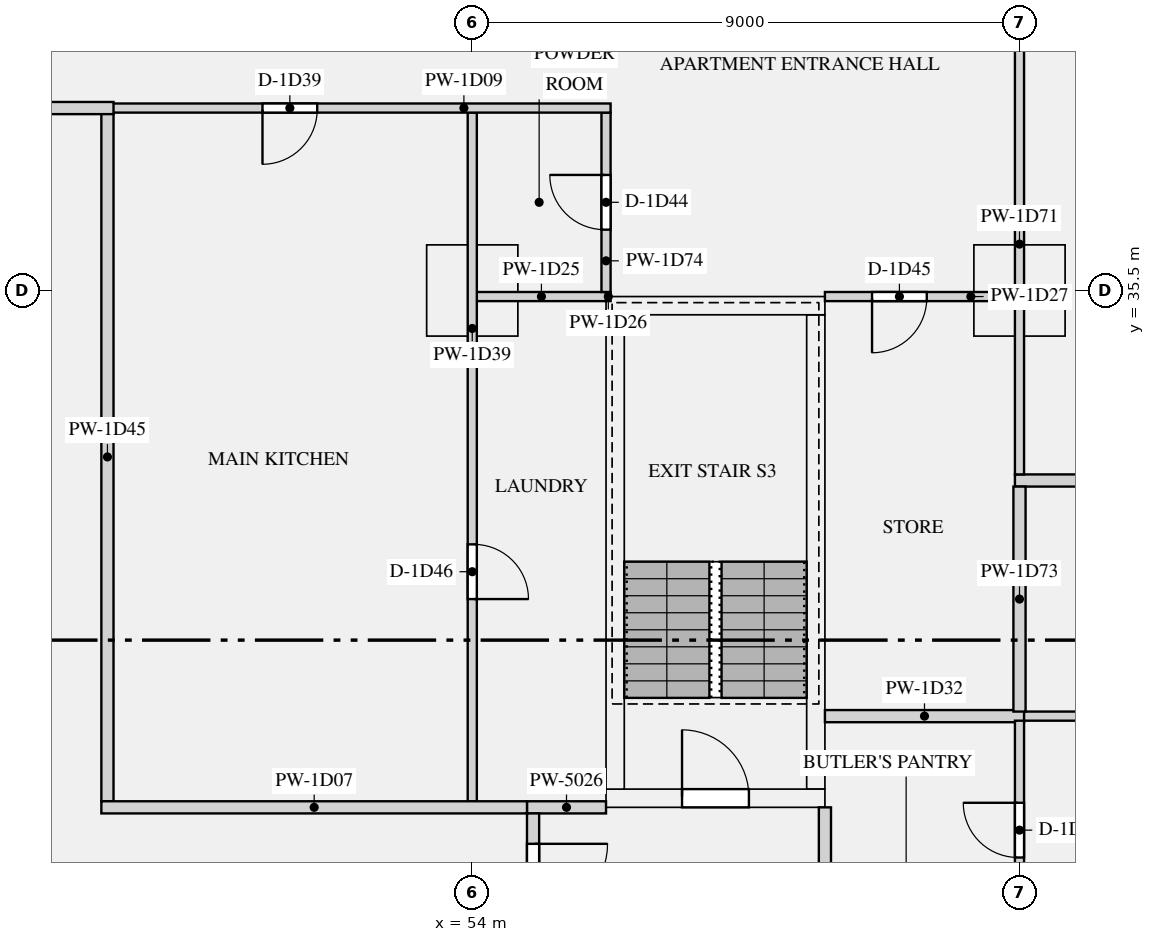
"""IFC4 building model, lengths in metres.
Left out: names, types, materials, properties, quantities, classifications, styles, units other than length and angle.
Written with IfcOpenShell. Run it as: python <this file> out.ifc"""

import sys

from ifc_helpers import new_model, si_unit, direction, frame, frame_2d, origin, origin_2d, place, context, subcontext, project, spatial, rectangle, extrude, element, fill, save


model = new_model("IFC4")
c1 = context("Model", 3, precision=1e-05, world=origin(), true_north=direction((0.0, 1.0)))
c2 = subcontext(c1, "Body", "Model", "MODEL_VIEW")
j1 = project(units=[si_unit("LENGTHUNIT", "METRE"), si_unit("PLANEANGLEUNIT", "RADIAN")], contexts=[c1])
p1 = place(None, origin())
s1 = spatial("IfcSite", under=j1, at=p1, CompositionType="ELEMENT")
p2 = place(p1, origin())
s2 = spatial("IfcBuilding", under=s1, at=p2, CompositionType="ELEMENT")
p3 = place(p2, frame((0.0, 0.0, 47.85)))
s3 = spatial("IfcBuildingStorey", under=s2, at=p3, CompositionType="ELEMENT", Elevation=47.85)
for number, where, z_axis, x_axis in (
    (1, (54.0, 35.5, 0.0), (0.0, 0.0, 1.0), (1.0, 0.0, 0.0)),
    (2, (63.0, 35.5, 0.0), (0.0, 0.0, 1.0), (1.0, 0.0, 0.0)),
):
    element("IfcColumn", number, at=place(p3, frame(where, z_axis=z_axis, x_axis=x_axis)), inside=s3, PredefinedType="COLUMN", context=c2, shape_type="SweptSolid", body=[
        extrude(rectangle(XDim=1.5, YDim=1.5, at=origin_2d()), origin(), (0.0, 0.0, 1.0), 3.15),
    ])
p4 = place(p3, frame((56.2, 27.15, 0.0), z_axis=(0.0, 0.0, 1.0), x_axis=(1.0, 0.0, 0.0)))
e3 = element("IfcWall", 3, at=p4, inside=s3, PredefinedType="SHEAR", context=c2, shape_type="SweptSolid", body=[
    extrude(rectangle(XDim=3.6, YDim=0.3, at=frame_2d((1.8, 0.0))), origin(), (0.0, 0.0, 1.0), 3.15),
])
p5 = place(p4, frame((1.25, 0.0, 0.0)))
e4 = element("IfcOpeningElement", 4, at=p5, cuts=e3, PredefinedType="OPENING", context=c2, shape_type="SweptSolid", body=[
    extrude(rectangle(XDim=1.1, YDim=2.1, at=frame_2d((0.55, 1.05))), frame((0.0, 0.16, 0.0), z_axis=(0.0, -1.0, 0.0), x_axis=(1.0, 0.0, 0.0)), (0.0, 0.0, 1.0), 0.32),
])
p6 = place(p3, frame((56.2, 35.25, 0.0), z_axis=(0.0, 0.0, 1.0), x_axis=(1.0, 0.0, 0.0)))
e5 = element("IfcWall", 5, at=p6, inside=s3, PredefinedType="SHEAR", context=c2, shape_type="SweptSolid", body=[
    extrude(rectangle(XDim=3.6, YDim=0.3, at=frame_2d((1.8, 0.0))), origin(), (0.0, 0.0, 1.0), 3.15),
])
for number, where, z_axis, x_axis in (
    (6, (56.35, 27.3, 0.0), (0.0, 0.0, 1.0), (0.0, 1.0, 0.0)),
    (7, (59.65, 27.3, 0.0), (0.0, 0.0, 1.0), (0.0, 1.0, 0.0)),
):
    element("IfcWall", number, at=place(p3, frame(where, z_axis=z_axis, x_axis=x_axis)), inside=s3, PredefinedType="SHEAR", context=c2, shape_type="SweptSolid", body=[
        extrude(rectangle(XDim=7.8, YDim=0.3, at=frame_2d((3.9, 0.0))), origin(), (0.0, 0.0, 1.0), 3.15),
    ])
p7 = place(p3, frame((54.9, 27.0, 0.0), z_axis=(0.0, 0.0, 1.0), x_axis=(1.0, 0.0, 0.0)))
e8 = element("IfcWall", 8, at=p7, inside=s3, PredefinedType="PARTITIONING", context=c2, shape_type="SweptSolid", body=[
    extrude(rectangle(XDim=1.3, YDim=0.2, at=frame_2d((0.65, 0.0))), origin(), (0.0, 0.0, 1.0), 2.83),
])
p8 = place(p3, frame((55.0, 23.1, 0.0), z_axis=(0.0, 0.0, 1.0), x_axis=(0.0, 1.0, 0.0)))
e9 = element("IfcWall", 9, at=p8, inside=s3, PredefinedType="PARTITIONING", context=c2, shape_type="SweptSolid", body=[
    extrude(rectangle(XDim=3.8, YDim=0.2, at=frame_2d((1.9, 0.0))), origin(), (0.0, 0.0, 1.0), 2.83),
])
p9 = place(p8, frame((2.1, 0.0, 0.0)))
e10 = element("IfcOpeningElement", 10, at=p9, cuts=e9, PredefinedType="OPENING", context=c2, shape_type="SweptSolid", body=[
    extrude(rectangle(XDim=1.2, YDim=2.1, at=frame_2d((0.6, 1.05))), frame((0.0, 0.11, 0.0), z_axis=(0.0, -1.0, 0.0), x_axis=(1.0, 0.0, 0.0)), (0.0, 0.0, 1.0), 0.22),
])
p10 = place(p3, frame((59.8, 23.1, 0.0), z_axis=(0.0, 0.0, 1.0), x_axis=(0.0, 1.0, 0.0)))
e11 = element("IfcWall", 11, at=p10, inside=s3, PredefinedType="PARTITIONING", context=c2, shape_type="SweptSolid", body=[
    extrude(rectangle(XDim=3.9, YDim=0.2, at=frame_2d((1.95, 0.0))), origin(), (0.0, 0.0, 1.0), 2.83),
])
p11 = place(p3, frame((47.9, 27.0, 0.0), z_axis=(0.0, 0.0, 1.0), x_axis=(1.0, 0.0, 0.0)))
e12 = element("IfcWall", 12, at=p11, inside=s3, PredefinedType="PARTITIONING", context=c2, shape_type="SweptSolid", body=[
    extrude(rectangle(XDim=7.0, YDim=0.2, at=frame_2d((3.5, 0.0))), origin(), (0.0, 0.0, 1.0), 2.83),
])
p12 = place(p3, frame((47.9, 38.5, 0.0), z_axis=(0.0, 0.0, 1.0), x_axis=(1.0, 0.0, 0.0)))
e13 = element("IfcWall", 13, at=p12, inside=s3, PredefinedType="PARTITIONING", context=c2, shape_type="SweptSolid", body=[
    extrude(rectangle(XDim=8.375, YDim=0.15, at=frame_2d((4.188, 0.0))), origin(), (0.0, 0.0, 1.0), 2.83),
])
p13 = place(p12, frame((2.65, 0.0, 0.0)))
e14 = element("IfcOpeningElement", 14, at=p13, cuts=e13, PredefinedType="OPENING", context=c2, shape_type="SweptSolid", body=[
    extrude(rectangle(XDim=0.9, YDim=2.1, at=frame_2d((0.45, 1.05))), frame((0.0, 0.085, 0.0), z_axis=(0.0, -1.0, 0.0), x_axis=(1.0, 0.0, 0.0)), (0.0, 0.0, 1.0), 0.17),
])
p14 = place(p3, frame((23.9, 38.5, 0.0), z_axis=(0.0, 0.0, 1.0), x_axis=(1.0, 0.0, 0.0)))
e15 = element("IfcWall", 15, at=p14, inside=s3, PredefinedType="PARTITIONING", context=c2, shape_type="SweptSolid", body=[
    extrude(rectangle(XDim=24.2, YDim=0.2, at=frame_2d((12.1, 0.0))), origin(), (0.0, 0.0, 1.0), 2.83),
])
p15 = place(p14, frame((3.55, 0.0, 0.0)))
e16 = element("IfcOpeningElement", 16, at=p15, cuts=e15, PredefinedType="OPENING", context=c2, shape_type="SweptSolid", body=[
    extrude(rectangle(XDim=1.1, YDim=2.1, at=frame_2d((0.55, 1.05))), frame((0.0, 0.11, 0.0), z_axis=(0.0, -1.0, 0.0), x_axis=(1.0, 0.0, 0.0)), (0.0, 0.0, 1.0), 0.22),
])
p16 = place(p14, frame((21.4, 0.0, 0.0)))
e17 = element("IfcOpeningElement", 17, at=p16, cuts=e15, PredefinedType="OPENING", context=c2, shape_type="SweptSolid", body=[
    extrude(rectangle(XDim=1.1, YDim=2.1, at=frame_2d((0.55, 1.05))), frame((0.0, 0.11, 0.0), z_axis=(0.0, -1.0, 0.0), x_axis=(1.0, 0.0, 0.0)), (0.0, 0.0, 1.0), 0.22),
])
p17 = place(p3, frame((62.925, 32.375, 0.0), z_axis=(0.0, 0.0, 1.0), x_axis=(1.0, 0.0, 0.0)))
e18 = element("IfcWall", 18, at=p17, inside=s3, PredefinedType="PARTITIONING", context=c2, shape_type="SweptSolid", body=[
    extrude(rectangle(XDim=12.775, YDim=0.2, at=frame_2d((6.387, 0.0))), origin(), (0.0, 0.0, 1.0), 2.83),
])
p18 = place(p3, frame((54.075, 35.4, 0.0), z_axis=(0.0, 0.0, 1.0), x_axis=(1.0, 0.0, 0.0)))
e19 = element("IfcWall", 19, at=p18, inside=s3, PredefinedType="PARTITIONING", context=c2, shape_type="SweptSolid", body=[
    extrude(rectangle(XDim=2.125, YDim=0.15, at=frame_2d((1.062, 0.0))), origin(), (0.0, 0.0, 1.0), 2.83),
])
p19 = place(p3, frame((56.2, 35.4, 0.0), z_axis=(0.0, 0.0, 1.0), x_axis=(1.0, 0.0, 0.0)))
e20 = element("IfcWall", 20, at=p19, inside=s3, PredefinedType="PARTITIONING", context=c2, shape_type="SweptSolid", body=[
    extrude(rectangle(XDim=0.075, YDim=0.15, at=frame_2d((0.038, 0.0))), origin(), (0.0, 0.0, 1.0), 2.83),
])
p20 = place(p3, frame((59.8, 35.4, 0.0), z_axis=(0.0, 0.0, 1.0), x_axis=(1.0, 0.0, 0.0)))
e21 = element("IfcWall", 21, at=p20, inside=s3, PredefinedType="PARTITIONING", context=c2, shape_type="SweptSolid", body=[
    extrude(rectangle(XDim=3.125, YDim=0.15, at=frame_2d((1.562, 0.0))), origin(), (0.0, 0.0, 1.0), 2.83),
])
p21 = place(p20, frame((0.775, 0.0, 0.0)))
e22 = element("IfcOpeningElement", 22, at=p21, cuts=e21, PredefinedType="OPENING", context=c2, shape_type="SweptSolid", body=[
    extrude(rectangle(XDim=0.9, YDim=2.1, at=frame_2d((0.45, 1.05))), frame((0.0, 0.085, 0.0), z_axis=(0.0, -1.0, 0.0), x_axis=(1.0, 0.0, 0.0)), (0.0, 0.0, 1.0), 0.17),
])
p22 = place(p3, frame((62.925, 28.5, 0.0), z_axis=(0.0, 0.0, 1.0), x_axis=(1.0, 0.0, 0.0)))
e23 = element("IfcWall", 23, at=p22, inside=s3, PredefinedType="PARTITIONING", context=c2, shape_type="SweptSolid", body=[
    extrude(rectangle(XDim=10.275, YDim=0.15, at=frame_2d((5.137, 0.0))), origin(), (0.0, 0.0, 1.0), 2.83),
])
p23 = place(p22, frame((4.5, 0.0, 0.0)))
e24 = element("IfcOpeningElement", 24, at=p23, cuts=e23, PredefinedType="OPENING", context=c2, shape_type="SweptSolid", body=[
    extrude(rectangle(XDim=1.5, YDim=2.1, at=frame_2d((0.75, 1.05))), frame((0.0, 0.085, 0.0), z_axis=(0.0, -1.0, 0.0), x_axis=(1.0, 0.0, 0.0)), (0.0, 0.0, 1.0), 0.17),
])
p24 = place(p3, frame((59.8, 28.5, 0.0), z_axis=(0.0, 0.0, 1.0), x_axis=(1.0, 0.0, 0.0)))
e25 = element("IfcWall", 25, at=p24, inside=s3, PredefinedType="PARTITIONING", context=c2, shape_type="SweptSolid", body=[
    extrude(rectangle(XDim=3.275, YDim=0.2, at=frame_2d((1.637, 0.0))), origin(), (0.0, 0.0, 1.0), 2.83),
])
p25 = place(p3, frame((54.0, 27.1, 0.0), z_axis=(0.0, 0.0, 1.0), x_axis=(0.0, 1.0, 0.0)))
e26 = element("IfcWall", 26, at=p25, inside=s3, PredefinedType="PARTITIONING", context=c2, shape_type="SweptSolid", body=[
    extrude(rectangle(XDim=11.325, YDim=0.15, at=frame_2d((5.663, 0.0))), origin(), (0.0, 0.0, 1.0), 2.83),
])
p26 = place(p25, frame((3.325, 0.0, 0.0)))
e27 = element("IfcOpeningElement", 27, at=p26, cuts=e26, PredefinedType="OPENING", context=c2, shape_type="SweptSolid", body=[
    extrude(rectangle(XDim=0.9, YDim=2.1, at=frame_2d((0.45, 1.05))), frame((0.0, 0.085, 0.0), z_axis=(0.0, -1.0, 0.0), x_axis=(1.0, 0.0, 0.0)), (0.0, 0.0, 1.0), 0.17),
])
p27 = place(p3, frame((48.0, 27.1, 0.0), z_axis=(0.0, 0.0, 1.0), x_axis=(0.0, 1.0, 0.0)))
e28 = element("IfcWall", 28, at=p27, inside=s3, PredefinedType="PARTITIONING", context=c2, shape_type="SweptSolid", body=[
    extrude(rectangle(XDim=11.325, YDim=0.2, at=frame_2d((5.663, 0.0))), origin(), (0.0, 0.0, 1.0), 2.83),
])
p28 = place(p3, frame((63.0, 24.075, 0.0), z_axis=(0.0, 0.0, 1.0), x_axis=(0.0, 1.0, 0.0)))
e29 = element("IfcWall", 29, at=p28, inside=s3, PredefinedType="PARTITIONING", context=c2, shape_type="SweptSolid", body=[
    extrude(rectangle(XDim=4.35, YDim=0.15, at=frame_2d((2.175, 0.0))), origin(), (0.0, 0.0, 1.0), 2.83),
])
p29 = place(p28, frame((2.1, 0.0, 0.0)))
e30 = element("IfcOpeningElement", 30, at=p29, cuts=e29, PredefinedType="OPENING", context=c2, shape_type="SweptSolid", body=[
    extrude(rectangle(XDim=0.9, YDim=2.1, at=frame_2d((0.45, 1.05))), frame((0.0, 0.085, 0.0), z_axis=(0.0, -1.0, 0.0), x_axis=(1.0, 0.0, 0.0)), (0.0, 0.0, 1.0), 0.17),
])
p30 = place(p3, frame((63.0, 32.475, 0.0), z_axis=(0.0, 0.0, 1.0), x_axis=(0.0, 1.0, 0.0)))
e31 = element("IfcWall", 31, at=p30, inside=s3, PredefinedType="PARTITIONING", context=c2, shape_type="SweptSolid", body=[
    extrude(rectangle(XDim=7.575, YDim=0.15, at=frame_2d((3.788, 0.0))), origin(), (0.0, 0.0, 1.0), 2.83),
])
p31 = place(p3, frame((63.0, 28.575, 0.0), z_axis=(0.0, 0.0, 1.0), x_axis=(0.0, 1.0, 0.0)))
e32 = element("IfcWall", 32, at=p31, inside=s3, PredefinedType="PARTITIONING", context=c2, shape_type="SweptSolid", body=[
    extrude(rectangle(XDim=3.7, YDim=0.2, at=frame_2d((1.85, 0.0))), origin(), (0.0, 0.0, 1.0), 2.83),
])
p32 = place(p3, frame((56.2, 35.475, 0.0), z_axis=(0.0, 0.0, 1.0), x_axis=(0.0, 1.0, 0.0)))
e33 = element("IfcWall", 33, at=p32, inside=s3, PredefinedType="PARTITIONING", context=c2, shape_type="SweptSolid", body=[
    extrude(rectangle(XDim=2.95, YDim=0.15, at=frame_2d((1.475, 0.0))), origin(), (0.0, 0.0, 1.0), 2.83),
])
p33 = place(p32, frame((1.025, 0.0, 0.0)))
e34 = element("IfcOpeningElement", 34, at=p33, cuts=e33, PredefinedType="OPENING", context=c2, shape_type="SweptSolid", body=[
    extrude(rectangle(XDim=0.9, YDim=2.1, at=frame_2d((0.45, 1.05))), frame((0.0, 0.085, 0.0), z_axis=(0.0, -1.0, 0.0), x_axis=(1.0, 0.0, 0.0)), (0.0, 0.0, 1.0), 0.17),
])
p34 = place(p5, origin())
e35 = element("IfcDoor", 35, at=p34, inside=s3, OperationType="SINGLE_SWING_LEFT", PredefinedType="DOOR", context=c2, shape_type="SweptSolid", body=[
    extrude(rectangle(XDim=1.1, YDim=2.1, at=frame_2d((0.55, 1.05))), frame((0.0, 0.025, 0.0), z_axis=(0.0, -1.0, 0.0), x_axis=(1.0, 0.0, 0.0)), (0.0, 0.0, 1.0), 0.05),
])
fill(e4, e35)
p35 = place(p9, frame((1.2, 0.0, 0.0), z_axis=(0.0, 0.0, 1.0), x_axis=(-1.0, 0.0, 0.0)))
e36 = element("IfcDoor", 36, at=p35, inside=s3, OperationType="SINGLE_SWING_LEFT", PredefinedType="DOOR", context=c2, shape_type="SweptSolid", body=[
    extrude(rectangle(XDim=1.2, YDim=2.1, at=frame_2d((0.6, 1.05))), frame((0.0, 0.025, 0.0), z_axis=(0.0, -1.0, 0.0), x_axis=(1.0, 0.0, 0.0)), (0.0, 0.0, 1.0), 0.05),
])
fill(e10, e36)
p36 = place(p13, frame((0.9, 0.0, 0.0), z_axis=(0.0, 0.0, 1.0), x_axis=(-1.0, 0.0, 0.0)))
e37 = element("IfcDoor", 37, at=p36, inside=s3, OperationType="SINGLE_SWING_RIGHT", PredefinedType="DOOR", context=c2, shape_type="SweptSolid", body=[
    extrude(rectangle(XDim=0.9, YDim=2.1, at=frame_2d((0.45, 1.05))), frame((0.0, 0.025, 0.0), z_axis=(0.0, -1.0, 0.0), x_axis=(1.0, 0.0, 0.0)), (0.0, 0.0, 1.0), 0.05),
])
fill(e14, e37)
p37 = place(p33, origin())
e38 = element("IfcDoor", 38, at=p37, inside=s3, OperationType="SINGLE_SWING_RIGHT", PredefinedType="DOOR", context=c2, shape_type="SweptSolid", body=[
    extrude(rectangle(XDim=0.9, YDim=2.1, at=frame_2d((0.45, 1.05))), frame((0.0, 0.025, 0.0), z_axis=(0.0, -1.0, 0.0), x_axis=(1.0, 0.0, 0.0)), (0.0, 0.0, 1.0), 0.05),
])
fill(e34, e38)
p38 = place(p21, frame((0.9, 0.0, 0.0), z_axis=(0.0, 0.0, 1.0), x_axis=(-1.0, 0.0, 0.0)))
e39 = element("IfcDoor", 39, at=p38, inside=s3, OperationType="SINGLE_SWING_RIGHT", PredefinedType="DOOR", context=c2, shape_type="SweptSolid", body=[
    extrude(rectangle(XDim=0.9, YDim=2.1, at=frame_2d((0.45, 1.05))), frame((0.0, 0.025, 0.0), z_axis=(0.0, -1.0, 0.0), x_axis=(1.0, 0.0, 0.0)), (0.0, 0.0, 1.0), 0.05),
])
fill(e22, e39)
p39 = place(p26, frame((0.9, 0.0, 0.0), z_axis=(0.0, 0.0, 1.0), x_axis=(-1.0, 0.0, 0.0)))
e40 = element("IfcDoor", 40, at=p39, inside=s3, OperationType="SINGLE_SWING_RIGHT", PredefinedType="DOOR", context=c2, shape_type="SweptSolid", body=[
    extrude(rectangle(XDim=0.9, YDim=2.1, at=frame_2d((0.45, 1.05))), frame((0.0, 0.025, 0.0), z_axis=(0.0, -1.0, 0.0), x_axis=(1.0, 0.0, 0.0)), (0.0, 0.0, 1.0), 0.05),
])
fill(e27, e40)
p40 = place(p29, origin())
e41 = element("IfcDoor", 41, at=p40, inside=s3, OperationType="SINGLE_SWING_RIGHT", PredefinedType="DOOR", context=c2, shape_type="SweptSolid", body=[
    extrude(rectangle(XDim=0.9, YDim=2.1, at=frame_2d((0.45, 1.05))), frame((0.0, 0.025, 0.0), z_axis=(0.0, -1.0, 0.0), x_axis=(1.0, 0.0, 0.0)), (0.0, 0.0, 1.0), 0.05),
])
fill(e30, e41)
save(model, sys.argv[1])
